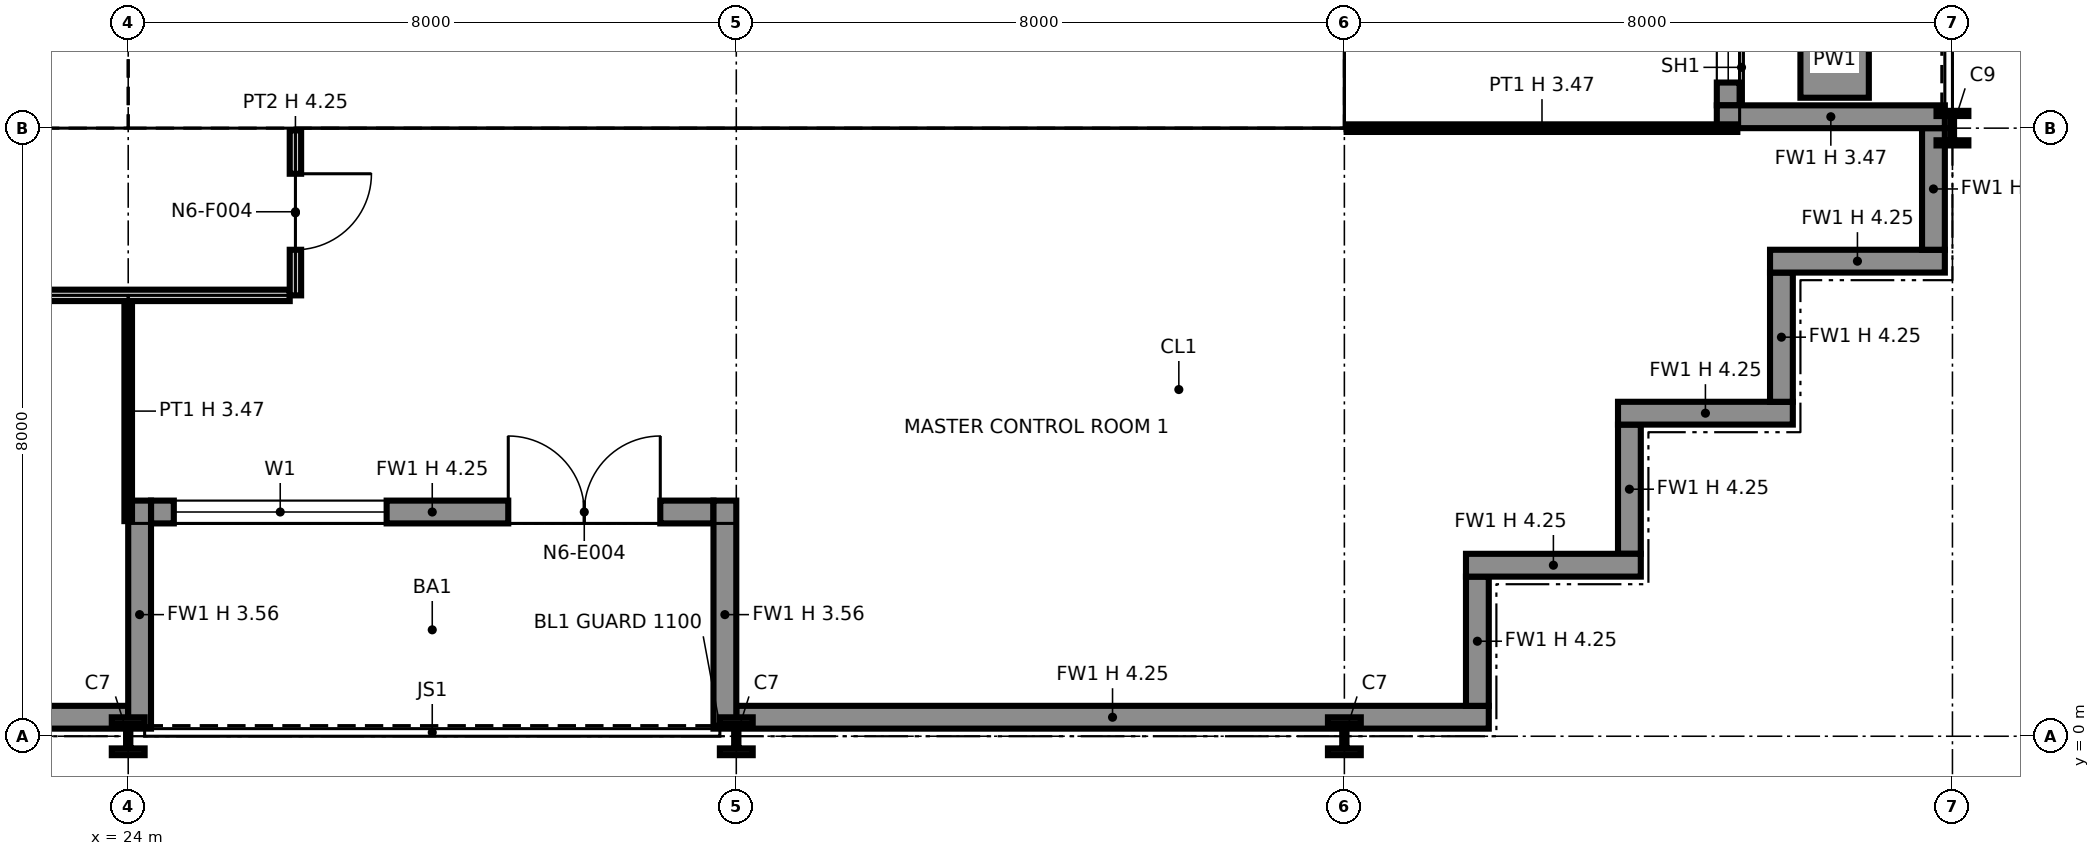
"""IFC4 building model, lengths in metres.
Left out: names, types, materials, properties, quantities, classifications, styles, units other than length and angle.
Written with IfcOpenShell. Run it as: python <this file> out.ifc"""

import sys

from ifc_helpers import new_model, si_unit, direction, frame, frame_2d, origin, origin_2d, place, context, subcontext, project, spatial, polyline, rectangle, i_section, outline, extrude, element, fill, save


model = new_model("IFC4")
c1 = context("Model", 3, precision=1e-05, world=origin(), true_north=direction((0.0, 1.0)))
c2 = subcontext(c1, "Body", "Model", "MODEL_VIEW")
j1 = project(units=[si_unit("LENGTHUNIT", "METRE"), si_unit("PLANEANGLEUNIT", "RADIAN")], contexts=[c1])
p1 = place(None, origin())
s1 = spatial("IfcSite", under=j1, at=p1, CompositionType="ELEMENT")
p2 = place(p1, origin())
s2 = spatial("IfcBuilding", under=s1, at=p2, CompositionType="ELEMENT")
p3 = place(p2, frame((0.0, 0.0, 100.8)))
s3 = spatial("IfcBuildingStorey", under=s2, at=p3, CompositionType="ELEMENT", Elevation=100.8)
p4 = place(p3, frame((24.0, 0.0, 0.0), z_axis=(0.0, 0.0, 1.0), x_axis=(1.0, 0.0, 0.0)))
e1 = element("IfcColumn", 1, at=p4, inside=s3, PredefinedType="COLUMN", context=c2, shape_type="SweptSolid", body=[
    extrude(i_section(OverallWidth=0.432, OverallDepth=0.498, WebThickness=0.056, FlangeThickness=0.089, at=origin_2d()), origin(), (0.0, 0.0, 1.0), 4.25),
])
p5 = place(p3, frame((24.0, 8.0, 0.0), z_axis=(0.0, 0.0, 1.0), x_axis=(1.0, 0.0, 0.0)))
e2 = element("IfcColumn", 2, at=p5, inside=s3, PredefinedType="COLUMN", context=c2, shape_type="SweptSolid", body=[
    extrude(i_section(OverallWidth=0.411, OverallDepth=0.434, WebThickness=0.036, FlangeThickness=0.057, at=origin_2d()), origin(), (0.0, 0.0, 1.0), 4.25),
])
p6 = place(p3, frame((32.0, 0.0, 0.0), z_axis=(0.0, 0.0, 1.0), x_axis=(1.0, 0.0, 0.0)))
e3 = element("IfcColumn", 3, at=p6, inside=s3, PredefinedType="COLUMN", context=c2, shape_type="SweptSolid", body=[
    extrude(i_section(OverallWidth=0.432, OverallDepth=0.498, WebThickness=0.056, FlangeThickness=0.089, at=origin_2d()), origin(), (0.0, 0.0, 1.0), 4.25),
])
p7 = place(p3, frame((32.0, 8.0, 0.0), z_axis=(0.0, 0.0, 1.0), x_axis=(1.0, 0.0, 0.0)))
e4 = element("IfcColumn", 4, at=p7, inside=s3, PredefinedType="COLUMN", context=c2, shape_type="SweptSolid", body=[
    extrude(i_section(OverallWidth=0.406, OverallDepth=0.417, WebThickness=0.03, FlangeThickness=0.048, at=origin_2d()), origin(), (0.0, 0.0, 1.0), 4.25),
])
p8 = place(p3, frame((40.0, 0.0, 0.0), z_axis=(0.0, 0.0, 1.0), x_axis=(1.0, 0.0, 0.0)))
e5 = element("IfcColumn", 5, at=p8, inside=s3, PredefinedType="COLUMN", context=c2, shape_type="SweptSolid", body=[
    extrude(i_section(OverallWidth=0.432, OverallDepth=0.498, WebThickness=0.056, FlangeThickness=0.089, at=origin_2d()), origin(), (0.0, 0.0, 1.0), 4.25),
])
p9 = place(p3, frame((40.0, 8.0, 0.0), z_axis=(0.0, 0.0, 1.0), x_axis=(1.0, 0.0, 0.0)))
e6 = element("IfcColumn", 6, at=p9, inside=s3, PredefinedType="COLUMN", context=c2, shape_type="SweptSolid", body=[
    extrude(i_section(OverallWidth=0.406, OverallDepth=0.417, WebThickness=0.03, FlangeThickness=0.048, at=origin_2d()), origin(), (0.0, 0.0, 1.0), 4.25),
])
p10 = place(p3, frame((48.0, 8.0, 0.0), z_axis=(0.0, 0.0, 1.0), x_axis=(1.0, 0.0, 0.0)))
e7 = element("IfcColumn", 7, at=p10, inside=s3, PredefinedType="COLUMN", context=c2, shape_type="SweptSolid", body=[
    extrude(i_section(OverallWidth=0.419, OverallDepth=0.455, WebThickness=0.042, FlangeThickness=0.068, at=origin_2d()), origin(), (0.0, 0.0, 1.0), 4.25),
])
p11 = place(p3, frame((16.0, 0.25, 0.0), z_axis=(0.0, 0.0, 1.0), x_axis=(1.0, 0.0, 0.0)))
e8 = element("IfcWall", 8, at=p11, inside=s3, PredefinedType="SOLIDWALL", context=c2, shape_type="SweptSolid", body=[
    extrude(rectangle(XDim=8.0, YDim=0.3, at=frame_2d((4.0, 0.0))), origin(), (0.0, 0.0, 1.0), 4.25),
])
p12 = place(p3, frame((24.3, 2.95, 0.0), z_axis=(0.0, 0.0, 1.0), x_axis=(1.0, 0.0, 0.0)))
e9 = element("IfcWall", 9, at=p12, inside=s3, PredefinedType="SOLIDWALL", context=c2, shape_type="SweptSolid", body=[
    extrude(rectangle(XDim=7.4, YDim=0.3, at=frame_2d((3.7, 0.0))), origin(), (0.0, 0.0, 1.0), 4.25),
])
p13 = place(p12, frame((0.3, 0.0, 0.9)))
e10 = element("IfcOpeningElement", 10, at=p13, cuts=e9, PredefinedType="OPENING", context=c2, shape_type="SweptSolid", body=[
    extrude(rectangle(XDim=2.8, YDim=2.2, at=frame_2d((1.4, 1.1))), frame((0.0, 0.16, 0.0), z_axis=(0.0, -1.0, 0.0), x_axis=(1.0, 0.0, 0.0)), (0.0, 0.0, 1.0), 0.32),
])
p14 = place(p12, frame((4.7, 0.0, 0.0)))
e11 = element("IfcOpeningElement", 11, at=p14, cuts=e9, PredefinedType="OPENING", context=c2, shape_type="SweptSolid", body=[
    extrude(rectangle(XDim=2.0, YDim=2.4, at=frame_2d((1.0, 1.2))), frame((0.0, 0.16, 0.0), z_axis=(0.0, -1.0, 0.0), x_axis=(1.0, 0.0, 0.0)), (0.0, 0.0, 1.0), 0.32),
])
for number, where, z_axis, x_axis in (
    (12, (24.15, 0.1, 0.0), (0.0, 0.0, 1.0), (0.0, 1.0, 0.0)),
    (13, (31.85, 0.1, 0.0), (0.0, 0.0, 1.0), (0.0, 1.0, 0.0)),
):
    element("IfcWall", number, at=place(p3, frame(where, z_axis=z_axis, x_axis=x_axis)), inside=s3, PredefinedType="SOLIDWALL", context=c2, shape_type="SweptSolid", body=[
        extrude(rectangle(XDim=3.0, YDim=0.3, at=frame_2d((1.5, 0.0))), origin(), (0.0, 0.0, 1.0), 3.556),
    ])
p15 = place(p3, frame((32.0, 0.25, 0.0), z_axis=(0.0, 0.0, 1.0), x_axis=(1.0, 0.0, 0.0)))
e14 = element("IfcWall", 14, at=p15, inside=s3, PredefinedType="SOLIDWALL", context=c2, shape_type="SweptSolid", body=[
    extrude(rectangle(XDim=9.9, YDim=0.3, at=frame_2d((4.95, 0.0))), origin(), (0.0, 0.0, 1.0), 4.25),
])
p16 = place(p3, frame((41.75, 0.4, 0.0), z_axis=(0.0, 0.0, 1.0), x_axis=(0.0, 1.0, 0.0)))
e15 = element("IfcWall", 15, at=p16, inside=s3, PredefinedType="SOLIDWALL", context=c2, shape_type="SweptSolid", body=[
    extrude(rectangle(XDim=1.7, YDim=0.3, at=frame_2d((0.85, 0.0))), origin(), (0.0, 0.0, 1.0), 4.25),
])
p17 = place(p3, frame((41.6, 2.25, 0.0), z_axis=(0.0, 0.0, 1.0), x_axis=(1.0, 0.0, 0.0)))
e16 = element("IfcWall", 16, at=p17, inside=s3, PredefinedType="SOLIDWALL", context=c2, shape_type="SweptSolid", body=[
    extrude(rectangle(XDim=2.3, YDim=0.3, at=frame_2d((1.15, 0.0))), origin(), (0.0, 0.0, 1.0), 4.25),
])
p18 = place(p3, frame((43.75, 2.4, 0.0), z_axis=(0.0, 0.0, 1.0), x_axis=(0.0, 1.0, 0.0)))
e17 = element("IfcWall", 17, at=p18, inside=s3, PredefinedType="SOLIDWALL", context=c2, shape_type="SweptSolid", body=[
    extrude(rectangle(XDim=1.7, YDim=0.3, at=frame_2d((0.85, 0.0))), origin(), (0.0, 0.0, 1.0), 4.25),
])
p19 = place(p3, frame((43.6, 4.25, 0.0), z_axis=(0.0, 0.0, 1.0), x_axis=(1.0, 0.0, 0.0)))
e18 = element("IfcWall", 18, at=p19, inside=s3, PredefinedType="SOLIDWALL", context=c2, shape_type="SweptSolid", body=[
    extrude(rectangle(XDim=2.3, YDim=0.3, at=frame_2d((1.15, 0.0))), origin(), (0.0, 0.0, 1.0), 4.25),
])
p20 = place(p3, frame((45.75, 4.4, 0.0), z_axis=(0.0, 0.0, 1.0), x_axis=(0.0, 1.0, 0.0)))
e19 = element("IfcWall", 19, at=p20, inside=s3, PredefinedType="SOLIDWALL", context=c2, shape_type="SweptSolid", body=[
    extrude(rectangle(XDim=1.7, YDim=0.3, at=frame_2d((0.85, 0.0))), origin(), (0.0, 0.0, 1.0), 4.25),
])
p21 = place(p3, frame((45.6, 6.25, 0.0), z_axis=(0.0, 0.0, 1.0), x_axis=(1.0, 0.0, 0.0)))
e20 = element("IfcWall", 20, at=p21, inside=s3, PredefinedType="SOLIDWALL", context=c2, shape_type="SweptSolid", body=[
    extrude(rectangle(XDim=2.3, YDim=0.3, at=frame_2d((1.15, 0.0))), origin(), (0.0, 0.0, 1.0), 4.25),
])
p22 = place(p3, frame((47.75, 6.4, 0.0), z_axis=(0.0, 0.0, 1.0), x_axis=(0.0, 1.0, 0.0)))
e21 = element("IfcWall", 21, at=p22, inside=s3, PredefinedType="SOLIDWALL", context=c2, shape_type="SweptSolid", body=[
    extrude(rectangle(XDim=1.6, YDim=0.3, at=frame_2d((0.8, 0.0))), origin(), (0.0, 0.0, 1.0), 4.25),
])
p23 = place(p3, frame((45.05, 8.3, 0.0), z_axis=(0.0, 0.0, 1.0), x_axis=(0.0, 1.0, 0.0)))
e22 = element("IfcWall", 22, at=p23, inside=s3, PredefinedType="SOLIDWALL", context=c2, shape_type="SweptSolid", body=[
    extrude(rectangle(XDim=7.4, YDim=0.3, at=frame_2d((3.7, 0.0))), origin(), (0.0, 0.0, 1.0), 4.25),
])
p24 = place(p23, frame((0.3, 0.0, 0.9)))
e23 = element("IfcOpeningElement", 23, at=p24, cuts=e22, PredefinedType="OPENING", context=c2, shape_type="SweptSolid", body=[
    extrude(rectangle(XDim=2.8, YDim=2.2, at=frame_2d((1.4, 1.1))), frame((0.0, 0.16, 0.0), z_axis=(0.0, -1.0, 0.0), x_axis=(1.0, 0.0, 0.0)), (0.0, 0.0, 1.0), 0.32),
])
p25 = place(p23, frame((4.7, 0.0, 0.0)))
e24 = element("IfcOpeningElement", 24, at=p25, cuts=e22, PredefinedType="OPENING", context=c2, shape_type="SweptSolid", body=[
    extrude(rectangle(XDim=2.0, YDim=2.4, at=frame_2d((1.0, 1.2))), frame((0.0, 0.16, 0.0), z_axis=(0.0, -1.0, 0.0), x_axis=(1.0, 0.0, 0.0)), (0.0, 0.0, 1.0), 0.32),
])
p26 = place(p3, frame((47.9, 8.15, 0.0), z_axis=(0.0, 0.0, 1.0), x_axis=(-1.0, 0.0, 0.0)))
e25 = element("IfcWall", 25, at=p26, inside=s3, PredefinedType="SOLIDWALL", context=c2, shape_type="SweptSolid", body=[
    extrude(rectangle(XDim=3.0, YDim=0.3, at=frame_2d((1.5, 0.0))), origin(), (0.0, 0.0, 1.0), 3.469),
])
p27 = place(p3, frame((46.45, 8.4, 0.0), z_axis=(0.0, 0.0, 1.0), x_axis=(0.0, 1.0, 0.0)))
e26 = element("IfcWall", 26, at=p27, inside=s3, PredefinedType="SOLIDWALL", context=c2, shape_type="SweptSolid", body=[
    extrude(rectangle(XDim=3.2, YDim=0.9, at=frame_2d((1.6, 0.0))), origin(), (0.0, 0.0, 1.0), 0.6),
])
p28 = place(p3, frame((8.65, 8.75, 0.0), z_axis=(0.0, 0.0, 1.0), x_axis=(1.0, 0.0, 0.0)))
e27 = element("IfcWall", 27, at=p28, inside=s3, PredefinedType="PARTITIONING", context=c2, shape_type="SweptSolid", body=[
    extrude(outline(polyline([(0.0, 0.0), (14.7, 0.0), (14.7, 4.25), (7.469, 4.25), (7.469, 3.632), (7.231, 3.632), (7.23, 4.25), (0.0, 4.25), (0.0, 0.0)])), frame((0.0, 0.1, 0.0), z_axis=(0.0, -1.0, 0.0), x_axis=(1.0, 0.0, 0.0)), (0.0, 0.0, 1.0), 0.2),
])
p29 = place(p28, frame((1.3, 0.0, 0.0)))
e28 = element("IfcOpeningElement", 28, at=p29, cuts=e27, PredefinedType="OPENING", context=c2, shape_type="SweptSolid", body=[
    extrude(rectangle(XDim=1.4, YDim=2.1, at=frame_2d((0.7, 1.05))), frame((0.0, 0.11, 0.0), z_axis=(0.0, -1.0, 0.0), x_axis=(1.0, 0.0, 0.0)), (0.0, 0.0, 1.0), 0.22),
])
p30 = place(p28, frame((4.6, 0.0, 0.0)))
e29 = element("IfcOpeningElement", 29, at=p30, cuts=e27, PredefinedType="OPENING", context=c2, shape_type="SweptSolid", body=[
    extrude(rectangle(XDim=1.4, YDim=2.1, at=frame_2d((0.7, 1.05))), frame((0.0, 0.11, 0.0), z_axis=(0.0, -1.0, 0.0), x_axis=(1.0, 0.0, 0.0)), (0.0, 0.0, 1.0), 0.22),
])
p31 = place(p28, frame((10.4, 0.0, 0.0)))
e30 = element("IfcOpeningElement", 30, at=p31, cuts=e27, PredefinedType="OPENING", context=c2, shape_type="SweptSolid", body=[
    extrude(rectangle(XDim=1.2, YDim=2.1, at=frame_2d((0.6, 1.05))), frame((0.0, 0.11, 0.0), z_axis=(0.0, -1.0, 0.0), x_axis=(1.0, 0.0, 0.0)), (0.0, 0.0, 1.0), 0.22),
])
p32 = place(p3, frame((23.25, 8.85, 0.0), z_axis=(0.0, 0.0, 1.0), x_axis=(0.0, 1.0, 0.0)))
e31 = element("IfcWall", 31, at=p32, inside=s3, PredefinedType="PARTITIONING", context=c2, shape_type="SweptSolid", body=[
    extrude(outline(polyline([(0.0, 0.0), (14.3, 0.0), (14.3, 4.25), (11.231, 4.25), (11.23, 3.789), (11.07, 3.789), (11.069, 4.25), (7.27, 4.25), (7.269, 3.632), (7.031, 3.632), (7.031, 4.25), (1.231, 4.25), (1.23, 3.789), (1.07, 3.789), (1.069, 4.25), (0.0, 4.25), (0.0, 0.0)])), frame((0.0, 0.1, 0.0), z_axis=(0.0, -1.0, 0.0), x_axis=(1.0, 0.0, 0.0)), (0.0, 0.0, 1.0), 0.2),
])
p33 = place(p32, frame((8.3, 0.0, 0.0)))
e32 = element("IfcOpeningElement", 32, at=p33, cuts=e31, PredefinedType="OPENING", context=c2, shape_type="SweptSolid", body=[
    extrude(rectangle(XDim=1.8, YDim=2.1, at=frame_2d((0.9, 1.05))), frame((0.0, 0.11, 0.0), z_axis=(0.0, -1.0, 0.0), x_axis=(1.0, 0.0, 0.0)), (0.0, 0.0, 1.0), 0.22),
])
p34 = place(p3, frame((24.65, 8.75, 0.0), z_axis=(0.0, 0.0, 1.0), x_axis=(1.0, 0.0, 0.0)))
e33 = element("IfcWall", 33, at=p34, inside=s3, PredefinedType="PARTITIONING", context=c2, shape_type="SweptSolid", body=[
    extrude(outline(polyline([(0.0, 0.0), (14.7, 0.0), (14.7, 4.25), (7.469, 4.25), (7.469, 3.632), (7.231, 3.632), (7.23, 4.25), (0.0, 4.25), (0.0, 0.0)])), frame((0.0, 0.1, 0.0), z_axis=(0.0, -1.0, 0.0), x_axis=(1.0, 0.0, 0.0)), (0.0, 0.0, 1.0), 0.2),
])
p35 = place(p3, frame((24.75, 8.85, 0.0), z_axis=(0.0, 0.0, 1.0), x_axis=(0.0, 1.0, 0.0)))
e34 = element("IfcWall", 34, at=p35, inside=s3, PredefinedType="PARTITIONING", context=c2, shape_type="SweptSolid", body=[
    extrude(outline(polyline([(0.0, 0.0), (6.3, 0.0), (6.3, 4.25), (3.231, 4.25), (3.23, 3.789), (3.07, 3.789), (3.069, 4.25), (0.0, 4.25), (0.0, 0.0)])), frame((0.0, 0.1, 0.0), z_axis=(0.0, -1.0, 0.0), x_axis=(1.0, 0.0, 0.0)), (0.0, 0.0, 1.0), 0.2),
])
for number, where, z_axis, x_axis in (
    (35, (27.875, 8.85, 0.0), (0.0, 0.0, 1.0), (0.0, 1.0, 0.0)),
    (36, (29.925, 8.85, 0.0), (0.0, 0.0, 1.0), (0.0, 1.0, 0.0)),
):
    element("IfcWall", number, at=place(p3, frame(where, z_axis=z_axis, x_axis=x_axis)), inside=s3, PredefinedType="PARTITIONING", context=c2, shape_type="SweptSolid", body=[
        extrude(outline(polyline([(0.0, 0.0), (4.2, 0.0), (4.2, 4.25), (3.231, 4.25), (3.23, 3.789), (3.07, 3.789), (3.069, 4.25), (0.0, 4.25), (0.0, 0.0)])), frame((0.0, 0.075, 0.0), z_axis=(0.0, -1.0, 0.0), x_axis=(1.0, 0.0, 0.0)), (0.0, 0.0, 1.0), 0.15),
    ])
p36 = place(p3, frame((32.0, 8.85, 0.0), z_axis=(0.0, 0.0, 1.0), x_axis=(0.0, 1.0, 0.0)))
e37 = element("IfcWall", 37, at=p36, inside=s3, PredefinedType="PARTITIONING", context=c2, shape_type="SweptSolid", body=[
    extrude(rectangle(XDim=4.2, YDim=0.6, at=frame_2d((2.1, 0.0))), origin(), (0.0, 0.0, 1.0), 3.632),
])
for number, where, z_axis, x_axis in (
    (38, (35.6, 8.85, 0.0), (0.0, 0.0, 1.0), (0.0, 1.0, 0.0)),
    (39, (39.25, 8.85, 0.0), (0.0, 0.0, 1.0), (0.0, 1.0, 0.0)),
):
    element("IfcWall", number, at=place(p3, frame(where, z_axis=z_axis, x_axis=x_axis)), inside=s3, PredefinedType="PARTITIONING", context=c2, shape_type="SweptSolid", body=[
        extrude(rectangle(XDim=6.3, YDim=0.2, at=frame_2d((3.15, 0.0))), origin(), (0.0, 0.0, 1.0), 4.25),
    ])
p37 = place(p3, frame((24.0, 2.83, 0.0), z_axis=(0.0, 0.0, 1.0), x_axis=(0.0, 1.0, 0.0)))
e40 = element("IfcWall", 40, at=p37, inside=s3, PredefinedType="PARTITIONING", context=c2, shape_type="SweptSolid", body=[
    extrude(rectangle(XDim=2.895, YDim=0.1, at=frame_2d((1.448, 0.0))), origin(), (0.0, 0.0, 1.0), 3.47),
])
p38 = place(p3, frame((5.875, 5.8, 0.0), z_axis=(0.0, 0.0, 1.0), x_axis=(1.0, 0.0, 0.0)))
e41 = element("IfcWall", 41, at=p38, inside=s3, PredefinedType="PARTITIONING", context=c2, shape_type="SweptSolid", body=[
    extrude(rectangle(XDim=20.25, YDim=0.15, at=frame_2d((10.125, 0.0))), origin(), (0.0, 0.0, 1.0), 4.25),
])
p39 = place(p38, frame((14.625, 0.0, 0.0), z_axis=(0.0, 0.0, 1.0), x_axis=(-1.0, 0.0, 0.0)))
e42 = element("IfcOpeningElement", 42, at=p39, cuts=e41, PredefinedType="OPENING", context=c2, shape_type="SweptSolid", body=[
    extrude(rectangle(XDim=1.0, YDim=2.1, at=frame_2d((0.5, 1.05))), frame((0.0, 0.085, 0.0), z_axis=(0.0, -1.0, 0.0), x_axis=(1.0, 0.0, 0.0)), (0.0, 0.0, 1.0), 0.17),
])
p40 = place(p38, frame((4.625, 0.0, 0.0), z_axis=(0.0, 0.0, 1.0), x_axis=(-1.0, 0.0, 0.0)))
e43 = element("IfcOpeningElement", 43, at=p40, cuts=e41, PredefinedType="OPENING", context=c2, shape_type="SweptSolid", body=[
    extrude(rectangle(XDim=1.0, YDim=2.1, at=frame_2d((0.5, 1.05))), frame((0.0, 0.085, 0.0), z_axis=(0.0, -1.0, 0.0), x_axis=(1.0, 0.0, 0.0)), (0.0, 0.0, 1.0), 0.17),
])
p41 = place(p38, frame((8.625, 0.0, 0.0), z_axis=(0.0, 0.0, 1.0), x_axis=(-1.0, 0.0, 0.0)))
e44 = element("IfcOpeningElement", 44, at=p41, cuts=e41, PredefinedType="OPENING", context=c2, shape_type="SweptSolid", body=[
    extrude(rectangle(XDim=1.0, YDim=2.1, at=frame_2d((0.5, 1.05))), frame((0.0, 0.085, 0.0), z_axis=(0.0, -1.0, 0.0), x_axis=(1.0, 0.0, 0.0)), (0.0, 0.0, 1.0), 0.17),
])
p42 = place(p3, frame((26.2, 5.8, 0.0), z_axis=(0.0, 0.0, 1.0), x_axis=(0.0, 1.0, 0.0)))
e45 = element("IfcWall", 45, at=p42, inside=s3, PredefinedType="PARTITIONING", context=c2, shape_type="SweptSolid", body=[
    extrude(rectangle(XDim=2.17, YDim=0.15, at=frame_2d((1.085, 0.0))), origin(), (0.0, 0.0, 1.0), 4.25),
])
p43 = place(p42, frame((1.6, 0.0, 0.0), z_axis=(0.0, 0.0, 1.0), x_axis=(-1.0, 0.0, 0.0)))
e46 = element("IfcOpeningElement", 46, at=p43, cuts=e45, PredefinedType="OPENING", context=c2, shape_type="SweptSolid", body=[
    extrude(rectangle(XDim=1.0, YDim=2.1, at=frame_2d((0.5, 1.05))), frame((0.0, 0.085, 0.0), z_axis=(0.0, -1.0, 0.0), x_axis=(1.0, 0.0, 0.0)), (0.0, 0.0, 1.0), 0.17),
])
p44 = place(p3, frame((40.03, 8.0, 0.0), z_axis=(0.0, 0.0, 1.0), x_axis=(1.0, 0.0, 0.0)))
e47 = element("IfcWall", 47, at=p44, inside=s3, PredefinedType="PARTITIONING", context=c2, shape_type="SweptSolid", body=[
    extrude(rectangle(XDim=5.14, YDim=0.1, at=frame_2d((2.57, 0.0))), origin(), (0.0, 0.0, 1.0), 3.47),
])
p45 = place(p13, origin())
e48 = element("IfcWindow", 48, at=p45, inside=s3, PartitioningType="SINGLE_PANEL", PredefinedType="WINDOW", context=c2, shape_type="SweptSolid", body=[
    extrude(rectangle(XDim=2.8, YDim=2.2, at=frame_2d((1.4, 1.1))), frame((0.0, 0.03, 0.0), z_axis=(0.0, -1.0, 0.0), x_axis=(1.0, 0.0, 0.0)), (0.0, 0.0, 1.0), 0.06),
])
fill(e10, e48)
p46 = place(p14, origin())
e49 = element("IfcDoor", 49, at=p46, inside=s3, OperationType="DOUBLE_DOOR_SINGLE_SWING", PredefinedType="DOOR", context=c2, shape_type="SweptSolid", body=[
    extrude(rectangle(XDim=2.0, YDim=2.4, at=frame_2d((1.0, 1.2))), frame((0.0, 0.025, 0.0), z_axis=(0.0, -1.0, 0.0), x_axis=(1.0, 0.0, 0.0)), (0.0, 0.0, 1.0), 0.05),
])
fill(e11, e49)
p47 = place(p24, origin())
e50 = element("IfcWindow", 50, at=p47, inside=s3, PartitioningType="SINGLE_PANEL", PredefinedType="WINDOW", context=c2, shape_type="SweptSolid", body=[
    extrude(rectangle(XDim=2.8, YDim=2.2, at=frame_2d((1.4, 1.1))), frame((0.0, 0.03, 0.0), z_axis=(0.0, -1.0, 0.0), x_axis=(1.0, 0.0, 0.0)), (0.0, 0.0, 1.0), 0.06),
])
fill(e23, e50)
p48 = place(p43, origin())
e51 = element("IfcDoor", 51, at=p48, inside=s3, OperationType="SINGLE_SWING_LEFT", PredefinedType="DOOR", context=c2, shape_type="SweptSolid", body=[
    extrude(rectangle(XDim=1.0, YDim=2.1, at=frame_2d((0.5, 1.05))), frame((0.0, 0.025, 0.0), z_axis=(0.0, -1.0, 0.0), x_axis=(1.0, 0.0, 0.0)), (0.0, 0.0, 1.0), 0.05),
])
fill(e46, e51)
save(model, sys.argv[1])
